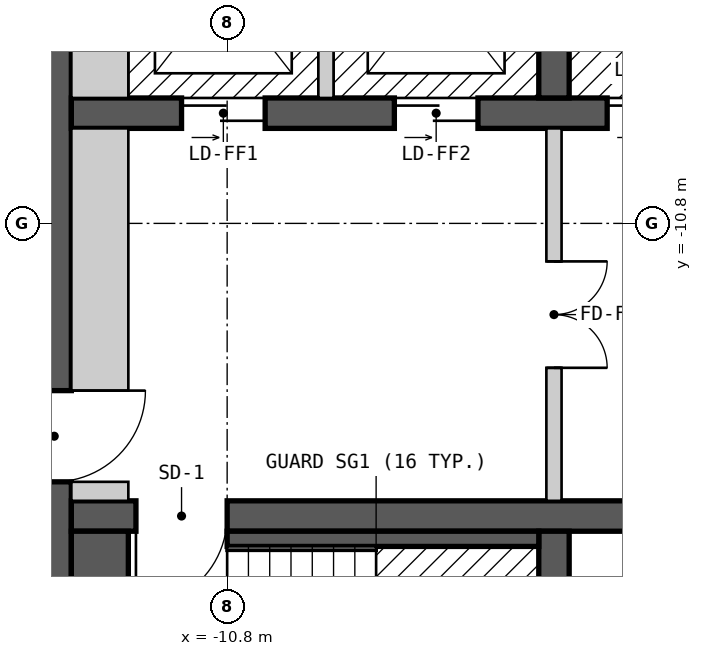
"""IFC4 building model, lengths in metres.
Left out: names, types, materials, properties, quantities, classifications, styles, units other than length and angle.
Written with IfcOpenShell. Run it as: python <this file> out.ifc"""

import sys

from ifc_helpers import new_model, si_unit, direction, frame, frame_2d, origin, place, context, subcontext, project, spatial, rectangle, extrude, element, fill, save


model = new_model("IFC4")
c1 = context("Model", 3, precision=1e-05, world=origin(), true_north=direction((0.0, 1.0)))
c2 = subcontext(c1, "Body", "Model", "MODEL_VIEW")
j1 = project(units=[si_unit("LENGTHUNIT", "METRE"), si_unit("PLANEANGLEUNIT", "RADIAN")], contexts=[c1])
p1 = place(None, origin())
s1 = spatial("IfcSite", under=j1, at=p1, CompositionType="ELEMENT")
p2 = place(p1, origin())
s2 = spatial("IfcBuilding", under=s1, at=p2, CompositionType="ELEMENT")
p3 = place(p2, frame((0.0, 0.0, 220.8)))
s3 = spatial("IfcBuildingStorey", under=s2, at=p3, CompositionType="ELEMENT", Elevation=220.8)
p4 = place(p3, frame((-13.075, -18.55, 0.0), z_axis=(0.0, 0.0, 1.0), x_axis=(0.0, 1.0, 0.0)))
e1 = element("IfcWall", 1, at=p4, inside=s3, PredefinedType="SHEAR", context=c2, shape_type="SweptSolid", body=[
    extrude(rectangle(XDim=13.1, YDim=0.45, at=frame_2d((6.55, 0.0))), origin(), (0.0, 0.0, 1.0), 2.7),
])
p5 = place(p4, frame((4.35, 0.0, 0.0)))
e2 = element("IfcOpeningElement", 2, at=p5, cuts=e1, PredefinedType="OPENING", context=c2, shape_type="SweptSolid", body=[
    extrude(rectangle(XDim=1.2, YDim=2.1, at=frame_2d((0.6, 1.05))), frame((0.0, 0.235, 0.0), z_axis=(0.0, -1.0, 0.0), x_axis=(1.0, 0.0, 0.0)), (0.0, 0.0, 1.0), 0.47),
])
p6 = place(p3, frame((-12.85, -14.65, 0.0), z_axis=(0.0, 0.0, 1.0), x_axis=(1.0, 0.0, 0.0)))
e3 = element("IfcWall", 3, at=p6, inside=s3, PredefinedType="SHEAR", context=c2, shape_type="SweptSolid", body=[
    extrude(rectangle(XDim=25.7, YDim=0.4, at=frame_2d((12.85, 0.0))), origin(), (0.0, 0.0, 1.0), 2.7),
])
p7 = place(p6, frame((2.05, 0.0, 0.0), z_axis=(0.0, 0.0, 1.0), x_axis=(-1.0, 0.0, 0.0)))
e4 = element("IfcOpeningElement", 4, at=p7, cuts=e3, PredefinedType="OPENING", context=c2, shape_type="SweptSolid", body=[
    extrude(rectangle(XDim=1.2, YDim=2.1, at=frame_2d((0.6, 1.05))), frame((0.0, 0.21, 0.0), z_axis=(0.0, -1.0, 0.0), x_axis=(1.0, 0.0, 0.0)), (0.0, 0.0, 1.0), 0.42),
])
p8 = place(p6, frame((24.9, 0.0, 0.0), z_axis=(0.0, 0.0, 1.0), x_axis=(-1.0, 0.0, 0.0)))
e5 = element("IfcOpeningElement", 5, at=p8, cuts=e3, PredefinedType="OPENING", context=c2, shape_type="SweptSolid", body=[
    extrude(rectangle(XDim=1.2, YDim=2.1, at=frame_2d((0.6, 1.05))), frame((0.0, 0.21, 0.0), z_axis=(0.0, -1.0, 0.0), x_axis=(1.0, 0.0, 0.0)), (0.0, 0.0, 1.0), 0.42),
])
p9 = place(p6, frame((8.75, 0.0, 0.0), z_axis=(0.0, 0.0, 1.0), x_axis=(-1.0, 0.0, 0.0)))
e6 = element("IfcOpeningElement", 6, at=p9, cuts=e3, PredefinedType="OPENING", context=c2, shape_type="SweptSolid", body=[
    extrude(rectangle(XDim=1.0, YDim=2.1, at=frame_2d((0.5, 1.05))), frame((0.0, 0.21, 0.0), z_axis=(0.0, -1.0, 0.0), x_axis=(1.0, 0.0, 0.0)), (0.0, 0.0, 1.0), 0.42),
])
p10 = place(p6, frame((11.5, 0.0, 0.0), z_axis=(0.0, 0.0, 1.0), x_axis=(-1.0, 0.0, 0.0)))
e7 = element("IfcOpeningElement", 7, at=p10, cuts=e3, PredefinedType="OPENING", context=c2, shape_type="SweptSolid", body=[
    extrude(rectangle(XDim=0.9, YDim=2.1, at=frame_2d((0.45, 1.05))), frame((0.0, 0.21, 0.0), z_axis=(0.0, -1.0, 0.0), x_axis=(1.0, 0.0, 0.0)), (0.0, 0.0, 1.0), 0.42),
])
p11 = place(p6, frame((14.3, 0.0, 0.0), z_axis=(0.0, 0.0, 1.0), x_axis=(-1.0, 0.0, 0.0)))
e8 = element("IfcOpeningElement", 8, at=p11, cuts=e3, PredefinedType="OPENING", context=c2, shape_type="SweptSolid", body=[
    extrude(rectangle(XDim=1.0, YDim=2.1, at=frame_2d((0.5, 1.05))), frame((0.0, 0.21, 0.0), z_axis=(0.0, -1.0, 0.0), x_axis=(1.0, 0.0, 0.0)), (0.0, 0.0, 1.0), 0.42),
])
p12 = place(p6, frame((17.9, 0.0, 0.0), z_axis=(0.0, 0.0, 1.0), x_axis=(-1.0, 0.0, 0.0)))
e9 = element("IfcOpeningElement", 9, at=p12, cuts=e3, PredefinedType="OPENING", context=c2, shape_type="SweptSolid", body=[
    extrude(rectangle(XDim=1.0, YDim=2.1, at=frame_2d((0.5, 1.05))), frame((0.0, 0.21, 0.0), z_axis=(0.0, -1.0, 0.0), x_axis=(1.0, 0.0, 0.0)), (0.0, 0.0, 1.0), 0.42),
])
p13 = place(p3, frame((-12.85, -9.35, 0.0), z_axis=(0.0, 0.0, 1.0), x_axis=(1.0, 0.0, 0.0)))
e10 = element("IfcWall", 10, at=p13, inside=s3, PredefinedType="SHEAR", context=c2, shape_type="SweptSolid", body=[
    extrude(rectangle(XDim=23.05, YDim=0.4, at=frame_2d((11.525, 0.0))), origin(), (0.0, 0.0, 1.0), 2.7),
])
p14 = place(p13, frame((1.45, 0.0, 0.0)))
e11 = element("IfcOpeningElement", 11, at=p14, cuts=e10, PredefinedType="OPENING", context=c2, shape_type="SweptSolid", body=[
    extrude(rectangle(XDim=1.1, YDim=2.1, at=frame_2d((0.55, 1.05))), frame((0.0, 0.21, 0.0), z_axis=(0.0, -1.0, 0.0), x_axis=(1.0, 0.0, 0.0)), (0.0, 0.0, 1.0), 0.42),
])
p15 = place(p13, frame((4.25, 0.0, 0.0)))
e12 = element("IfcOpeningElement", 12, at=p15, cuts=e10, PredefinedType="OPENING", context=c2, shape_type="SweptSolid", body=[
    extrude(rectangle(XDim=1.1, YDim=2.1, at=frame_2d((0.55, 1.05))), frame((0.0, 0.21, 0.0), z_axis=(0.0, -1.0, 0.0), x_axis=(1.0, 0.0, 0.0)), (0.0, 0.0, 1.0), 0.42),
])
p16 = place(p13, frame((7.05, 0.0, 0.0)))
e13 = element("IfcOpeningElement", 13, at=p16, cuts=e10, PredefinedType="OPENING", context=c2, shape_type="SweptSolid", body=[
    extrude(rectangle(XDim=1.1, YDim=2.1, at=frame_2d((0.55, 1.05))), frame((0.0, 0.21, 0.0), z_axis=(0.0, -1.0, 0.0), x_axis=(1.0, 0.0, 0.0)), (0.0, 0.0, 1.0), 0.42),
])
p17 = place(p13, frame((9.35, 0.0, 0.0)))
e14 = element("IfcOpeningElement", 14, at=p17, cuts=e10, PredefinedType="OPENING", context=c2, shape_type="SweptSolid", body=[
    extrude(rectangle(XDim=1.1, YDim=2.1, at=frame_2d((0.55, 1.05))), frame((0.0, 0.21, 0.0), z_axis=(0.0, -1.0, 0.0), x_axis=(1.0, 0.0, 0.0)), (0.0, 0.0, 1.0), 0.42),
])
p18 = place(p13, frame((11.65, 0.0, 0.0)))
e15 = element("IfcOpeningElement", 15, at=p18, cuts=e10, PredefinedType="OPENING", context=c2, shape_type="SweptSolid", body=[
    extrude(rectangle(XDim=1.1, YDim=2.1, at=frame_2d((0.55, 1.05))), frame((0.0, 0.21, 0.0), z_axis=(0.0, -1.0, 0.0), x_axis=(1.0, 0.0, 0.0)), (0.0, 0.0, 1.0), 0.42),
])
p19 = place(p13, frame((13.95, 0.0, 0.0)))
e16 = element("IfcOpeningElement", 16, at=p19, cuts=e10, PredefinedType="OPENING", context=c2, shape_type="SweptSolid", body=[
    extrude(rectangle(XDim=1.1, YDim=2.1, at=frame_2d((0.55, 1.05))), frame((0.0, 0.21, 0.0), z_axis=(0.0, -1.0, 0.0), x_axis=(1.0, 0.0, 0.0)), (0.0, 0.0, 1.0), 0.42),
])
p20 = place(p13, frame((16.25, 0.0, 0.0)))
e17 = element("IfcOpeningElement", 17, at=p20, cuts=e10, PredefinedType="OPENING", context=c2, shape_type="SweptSolid", body=[
    extrude(rectangle(XDim=1.1, YDim=2.1, at=frame_2d((0.55, 1.05))), frame((0.0, 0.21, 0.0), z_axis=(0.0, -1.0, 0.0), x_axis=(1.0, 0.0, 0.0)), (0.0, 0.0, 1.0), 0.42),
])
p21 = place(p13, frame((18.55, 0.0, 0.0)))
e18 = element("IfcOpeningElement", 18, at=p21, cuts=e10, PredefinedType="OPENING", context=c2, shape_type="SweptSolid", body=[
    extrude(rectangle(XDim=1.1, YDim=2.1, at=frame_2d((0.55, 1.05))), frame((0.0, 0.21, 0.0), z_axis=(0.0, -1.0, 0.0), x_axis=(1.0, 0.0, 0.0)), (0.0, 0.0, 1.0), 0.42),
])
p22 = place(p13, frame((20.95, 0.0, 0.0)))
e19 = element("IfcOpeningElement", 19, at=p22, cuts=e10, PredefinedType="OPENING", context=c2, shape_type="SweptSolid", body=[
    extrude(rectangle(XDim=1.1, YDim=2.1, at=frame_2d((0.55, 1.05))), frame((0.0, 0.21, 0.0), z_axis=(0.0, -1.0, 0.0), x_axis=(1.0, 0.0, 0.0)), (0.0, 0.0, 1.0), 0.42),
])
for number, where, z_axis, x_axis in (
    (20, (-6.5, -18.55, 0.0), (0.0, 0.0, 1.0), (0.0, 1.0, 0.0)),
    (21, (-6.5, -9.15, 0.0), (0.0, 0.0, 1.0), (0.0, 1.0, 0.0)),
):
    element("IfcWall", number, at=place(p3, frame(where, z_axis=z_axis, x_axis=x_axis)), inside=s3, PredefinedType="SHEAR", context=c2, shape_type="SweptSolid", body=[
        extrude(rectangle(XDim=3.7, YDim=0.4, at=frame_2d((1.85, 0.0))), origin(), (0.0, 0.0, 1.0), 2.7),
    ])
p23 = place(p3, frame((-12.475, -18.55, 0.0), z_axis=(0.0, 0.0, 1.0), x_axis=(0.0, 1.0, 0.0)))
e22 = element("IfcWall", 22, at=p23, inside=s3, PredefinedType="SOLIDWALL", context=c2, shape_type="SweptSolid", body=[
    extrude(rectangle(XDim=3.7, YDim=0.75, at=frame_2d((1.85, 0.0))), origin(), (0.0, 0.0, 1.0), 2.7),
])
p24 = place(p3, frame((-12.85, -14.325, 0.0), z_axis=(0.0, 0.0, 1.0), x_axis=(1.0, 0.0, 0.0)))
e23 = element("IfcWall", 23, at=p24, inside=s3, PredefinedType="PARTITIONING", context=c2, shape_type="SweptSolid", body=[
    extrude(rectangle(XDim=0.75, YDim=0.25, at=frame_2d((0.375, 0.0))), origin(), (0.0, 0.0, 1.0), 2.7),
])
p25 = place(p3, frame((-12.475, -13.0, 0.0), z_axis=(0.0, 0.0, 1.0), x_axis=(0.0, 1.0, 0.0)))
e24 = element("IfcWall", 24, at=p25, inside=s3, PredefinedType="PARTITIONING", context=c2, shape_type="SweptSolid", body=[
    extrude(rectangle(XDim=3.45, YDim=0.75, at=frame_2d((1.725, 0.0))), origin(), (0.0, 0.0, 1.0), 2.7),
])
p26 = place(p3, frame((-12.475, -9.15, 0.0), z_axis=(0.0, 0.0, 1.0), x_axis=(0.0, 1.0, 0.0)))
e25 = element("IfcWall", 25, at=p26, inside=s3, PredefinedType="SOLIDWALL", context=c2, shape_type="SweptSolid", body=[
    extrude(rectangle(XDim=3.7, YDim=0.75, at=frame_2d((1.85, 0.0))), origin(), (0.0, 0.0, 1.0), 2.7),
])
p27 = place(p3, frame((-10.8, -14.95, 0.0), z_axis=(0.0, 0.0, 1.0), x_axis=(1.0, 0.0, 0.0)))
e26 = element("IfcWall", 26, at=p27, inside=s3, PredefinedType="SOLIDWALL", context=c2, shape_type="SweptSolid", body=[
    extrude(rectangle(XDim=4.1, YDim=0.2, at=frame_2d((2.05, 0.0))), origin(), (0.0, 0.0, 1.0), 2.7),
])
p28 = place(p3, frame((-9.5, -9.15, 0.0), z_axis=(0.0, 0.0, 1.0), x_axis=(0.0, 1.0, 0.0)))
e27 = element("IfcWall", 27, at=p28, inside=s3, PredefinedType="SOLIDWALL", context=c2, shape_type="SweptSolid", body=[
    extrude(rectangle(XDim=2.95, YDim=0.2, at=frame_2d((1.475, 0.0))), origin(), (0.0, 0.0, 1.0), 2.7),
])
p29 = place(p3, frame((-6.5, -14.45, 0.0), z_axis=(0.0, 0.0, 1.0), x_axis=(0.0, 1.0, 0.0)))
e28 = element("IfcWall", 28, at=p29, inside=s3, PredefinedType="PARTITIONING", context=c2, shape_type="SweptSolid", body=[
    extrude(rectangle(XDim=4.9, YDim=0.2, at=frame_2d((2.45, 0.0))), origin(), (0.0, 0.0, 1.0), 2.7),
])
p30 = place(p29, frame((3.15, 0.0, 0.0), z_axis=(0.0, 0.0, 1.0), x_axis=(-1.0, 0.0, 0.0)))
e29 = element("IfcOpeningElement", 29, at=p30, cuts=e28, PredefinedType="OPENING", context=c2, shape_type="SweptSolid", body=[
    extrude(rectangle(XDim=1.4, YDim=2.1, at=frame_2d((0.7, 1.05))), frame((0.0, 0.11, 0.0), z_axis=(0.0, -1.0, 0.0), x_axis=(1.0, 0.0, 0.0)), (0.0, 0.0, 1.0), 0.22),
])
p31 = place(p14, origin())
e30 = element("IfcDoor", 30, at=p31, inside=s3, OperationType="DOUBLE_DOOR_SLIDING", PredefinedType="DOOR", context=c2, shape_type="SweptSolid", body=[
    extrude(rectangle(XDim=1.1, YDim=2.1, at=frame_2d((0.55, 1.05))), frame((0.0, 0.025, 0.0), z_axis=(0.0, -1.0, 0.0), x_axis=(1.0, 0.0, 0.0)), (0.0, 0.0, 1.0), 0.05),
])
fill(e11, e30)
p32 = place(p15, origin())
e31 = element("IfcDoor", 31, at=p32, inside=s3, OperationType="DOUBLE_DOOR_SLIDING", PredefinedType="DOOR", context=c2, shape_type="SweptSolid", body=[
    extrude(rectangle(XDim=1.1, YDim=2.1, at=frame_2d((0.55, 1.05))), frame((0.0, 0.025, 0.0), z_axis=(0.0, -1.0, 0.0), x_axis=(1.0, 0.0, 0.0)), (0.0, 0.0, 1.0), 0.05),
])
fill(e12, e31)
p33 = place(p16, origin())
e32 = element("IfcDoor", 32, at=p33, inside=s3, OperationType="DOUBLE_DOOR_SLIDING", PredefinedType="DOOR", context=c2, shape_type="SweptSolid", body=[
    extrude(rectangle(XDim=1.1, YDim=2.1, at=frame_2d((0.55, 1.05))), frame((0.0, 0.025, 0.0), z_axis=(0.0, -1.0, 0.0), x_axis=(1.0, 0.0, 0.0)), (0.0, 0.0, 1.0), 0.05),
])
fill(e13, e32)
p34 = place(p7, origin())
e33 = element("IfcDoor", 33, at=p34, inside=s3, OperationType="SINGLE_SWING_RIGHT", PredefinedType="DOOR", context=c2, shape_type="SweptSolid", body=[
    extrude(rectangle(XDim=1.2, YDim=2.1, at=frame_2d((0.6, 1.05))), frame((0.0, 0.025, 0.0), z_axis=(0.0, -1.0, 0.0), x_axis=(1.0, 0.0, 0.0)), (0.0, 0.0, 1.0), 0.05),
])
fill(e4, e33)
p35 = place(p5, origin())
e34 = element("IfcDoor", 34, at=p35, inside=s3, OperationType="SINGLE_SWING_RIGHT", PredefinedType="DOOR", context=c2, shape_type="SweptSolid", body=[
    extrude(rectangle(XDim=1.2, YDim=2.1, at=frame_2d((0.6, 1.05))), frame((0.0, 0.025, 0.0), z_axis=(0.0, -1.0, 0.0), x_axis=(1.0, 0.0, 0.0)), (0.0, 0.0, 1.0), 0.05),
])
fill(e2, e34)
p36 = place(p30, origin())
e35 = element("IfcDoor", 35, at=p36, inside=s3, OperationType="DOUBLE_DOOR_SINGLE_SWING", PredefinedType="DOOR", context=c2, shape_type="SweptSolid", body=[
    extrude(rectangle(XDim=1.4, YDim=2.1, at=frame_2d((0.7, 1.05))), frame((0.0, 0.025, 0.0), z_axis=(0.0, -1.0, 0.0), x_axis=(1.0, 0.0, 0.0)), (0.0, 0.0, 1.0), 0.05),
])
fill(e29, e35)
save(model, sys.argv[1])
